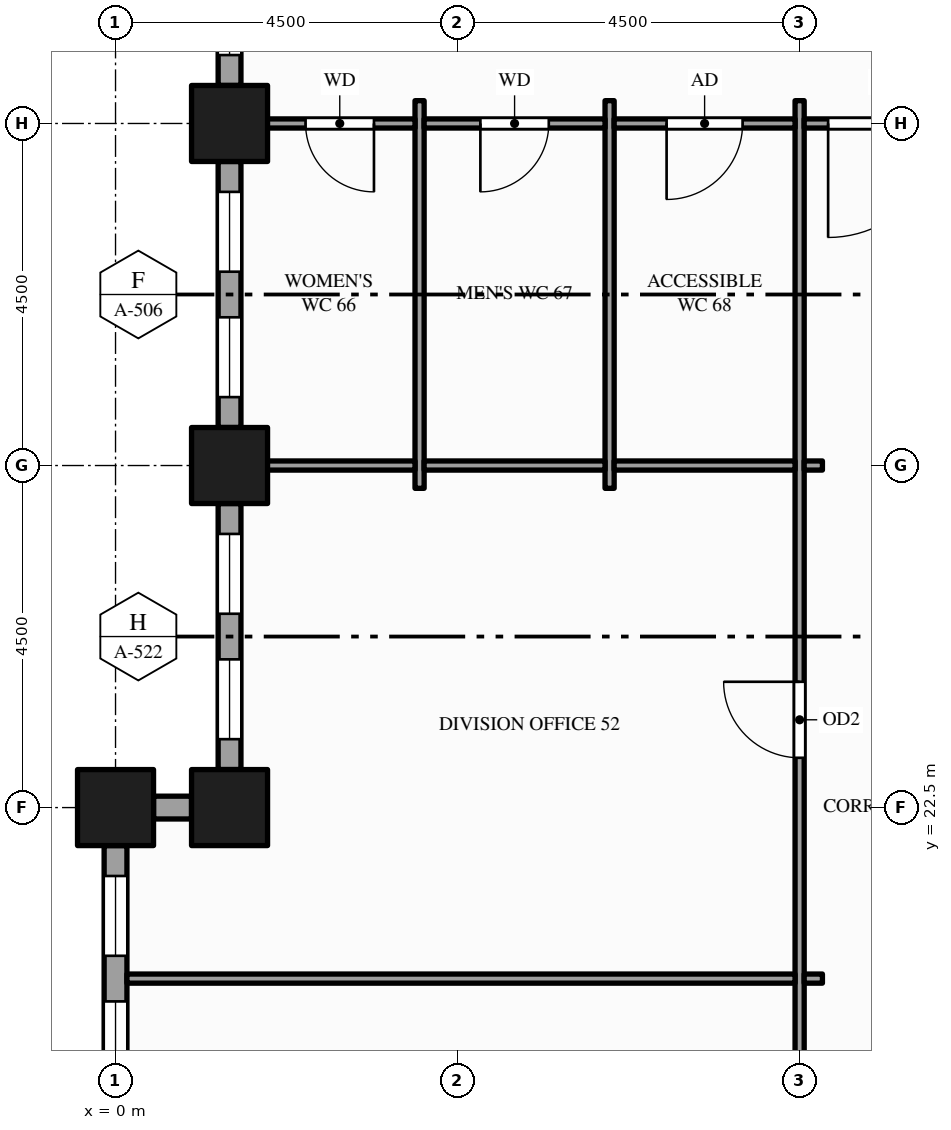
"""IFC4 building model, lengths in metres.
Left out: names, types, materials, properties, quantities, classifications, styles, units other than length and angle.
Written with IfcOpenShell. Run it as: python <this file> out.ifc"""

import sys

from ifc_helpers import new_model, si_unit, direction, frame, frame_2d, origin, origin_2d, place, context, subcontext, project, spatial, rectangle, hollow_rectangle, extrude, element, fill, save


model = new_model("IFC4")
c1 = context("Model", 3, precision=1e-05, world=origin(), true_north=direction((0.0, 1.0)))
c2 = subcontext(c1, "Body", "Model", "MODEL_VIEW")
j1 = project(units=[si_unit("LENGTHUNIT", "METRE"), si_unit("PLANEANGLEUNIT", "RADIAN")], contexts=[c1])
p1 = place(None, origin())
s1 = spatial("IfcSite", under=j1, at=p1, CompositionType="ELEMENT")
p2 = place(p1, origin())
s2 = spatial("IfcBuilding", under=s1, at=p2, CompositionType="ELEMENT")
p3 = place(p2, frame((0.0, 0.0, 127.0)))
s3 = spatial("IfcBuildingStorey", under=s2, at=p3, CompositionType="ELEMENT", Elevation=127.0)
for number, where, z_axis, x_axis in (
    (1, (0.0, 22.5, -0.15), (0.0, 0.0, 1.0), (1.0, 0.0, 0.0)),
    (2, (1.5, 22.5, -0.15), (0.0, 0.0, 1.0), (1.0, 0.0, 0.0)),
    (3, (1.5, 27.0, -0.15), (0.0, 0.0, 1.0), (1.0, 0.0, 0.0)),
    (4, (1.5, 31.5, -0.15), (0.0, 0.0, 1.0), (1.0, 0.0, 0.0)),
):
    element("IfcColumn", number, at=place(p3, frame(where, z_axis=z_axis, x_axis=x_axis)), inside=s3, PredefinedType="COLUMN", context=c2, shape_type="SweptSolid", body=[
        extrude(hollow_rectangle(XDim=1.0, YDim=1.0, WallThickness=0.05, at=origin_2d()), origin(), (0.0, 0.0, 1.0), 3.9),
    ])
p4 = place(p3, frame((1.5, 36.0, 0.0), z_axis=(0.0, 0.0, 1.0), x_axis=(0.0, -1.0, 0.0)))
e5 = element("IfcWall", 5, at=p4, inside=s3, PredefinedType="STANDARD", context=c2, shape_type="SweptSolid", body=[
    extrude(rectangle(XDim=4.0, YDim=0.3, at=frame_2d((2.0, 0.0))), origin(), (0.0, 0.0, 1.0), 3.054),
])
p5 = place(p4, frame((0.4, 0.0, 0.9)))
e6 = element("IfcOpeningElement", 6, at=p5, cuts=e5, PredefinedType="OPENING", context=c2, shape_type="SweptSolid", body=[
    extrude(rectangle(XDim=1.55, YDim=2.0, at=frame_2d((0.775, 1.0))), frame((0.0, 0.16, 0.0), z_axis=(0.0, -1.0, 0.0), x_axis=(1.0, 0.0, 0.0)), (0.0, 0.0, 1.0), 0.32),
])
p6 = place(p4, frame((2.55, 0.0, 0.9)))
e7 = element("IfcOpeningElement", 7, at=p6, cuts=e5, PredefinedType="OPENING", context=c2, shape_type="SweptSolid", body=[
    extrude(rectangle(XDim=1.05, YDim=2.0, at=frame_2d((0.525, 1.0))), frame((0.0, 0.16, 0.0), z_axis=(0.0, -1.0, 0.0), x_axis=(1.0, 0.0, 0.0)), (0.0, 0.0, 1.0), 0.32),
])
p7 = place(p3, frame((1.5, 31.0, 0.0), z_axis=(0.0, 0.0, 1.0), x_axis=(0.0, -1.0, 0.0)))
e8 = element("IfcWall", 8, at=p7, inside=s3, PredefinedType="STANDARD", context=c2, shape_type="SweptSolid", body=[
    extrude(rectangle(XDim=3.5, YDim=0.3, at=frame_2d((1.75, 0.0))), origin(), (0.0, 0.0, 1.0), 3.054),
])
p8 = place(p7, frame((0.4, 0.0, 0.9)))
e9 = element("IfcOpeningElement", 9, at=p8, cuts=e8, PredefinedType="OPENING", context=c2, shape_type="SweptSolid", body=[
    extrude(rectangle(XDim=1.05, YDim=2.0, at=frame_2d((0.525, 1.0))), frame((0.0, 0.16, 0.0), z_axis=(0.0, -1.0, 0.0), x_axis=(1.0, 0.0, 0.0)), (0.0, 0.0, 1.0), 0.32),
])
p9 = place(p7, frame((2.05, 0.0, 0.9)))
e10 = element("IfcOpeningElement", 10, at=p9, cuts=e8, PredefinedType="OPENING", context=c2, shape_type="SweptSolid", body=[
    extrude(rectangle(XDim=1.05, YDim=2.0, at=frame_2d((0.525, 1.0))), frame((0.0, 0.16, 0.0), z_axis=(0.0, -1.0, 0.0), x_axis=(1.0, 0.0, 0.0)), (0.0, 0.0, 1.0), 0.32),
])
p10 = place(p3, frame((1.5, 26.5, 0.0), z_axis=(0.0, 0.0, 1.0), x_axis=(0.0, -1.0, 0.0)))
e11 = element("IfcWall", 11, at=p10, inside=s3, PredefinedType="STANDARD", context=c2, shape_type="SweptSolid", body=[
    extrude(rectangle(XDim=3.5, YDim=0.3, at=frame_2d((1.75, 0.0))), origin(), (0.0, 0.0, 1.0), 3.054),
])
p11 = place(p10, frame((0.4, 0.0, 0.9)))
e12 = element("IfcOpeningElement", 12, at=p11, cuts=e11, PredefinedType="OPENING", context=c2, shape_type="SweptSolid", body=[
    extrude(rectangle(XDim=1.05, YDim=2.0, at=frame_2d((0.525, 1.0))), frame((0.0, 0.16, 0.0), z_axis=(0.0, -1.0, 0.0), x_axis=(1.0, 0.0, 0.0)), (0.0, 0.0, 1.0), 0.32),
])
p12 = place(p10, frame((2.05, 0.0, 0.9)))
e13 = element("IfcOpeningElement", 13, at=p12, cuts=e11, PredefinedType="OPENING", context=c2, shape_type="SweptSolid", body=[
    extrude(rectangle(XDim=1.05, YDim=2.0, at=frame_2d((0.525, 1.0))), frame((0.0, 0.16, 0.0), z_axis=(0.0, -1.0, 0.0), x_axis=(1.0, 0.0, 0.0)), (0.0, 0.0, 1.0), 0.32),
])
p13 = place(p3, frame((1.0, 22.5, 0.0), z_axis=(0.0, 0.0, 1.0), x_axis=(-1.0, 0.0, 0.0)))
e14 = element("IfcWall", 14, at=p13, inside=s3, PredefinedType="STANDARD", context=c2, shape_type="SweptSolid", body=[
    extrude(rectangle(XDim=0.5, YDim=0.3, at=frame_2d((0.25, 0.0))), origin(), (0.0, 0.0, 1.0), 3.054),
])
p14 = place(p3, frame((0.0, 22.0, 0.0), z_axis=(0.0, 0.0, 1.0), x_axis=(0.0, -1.0, 0.0)))
e15 = element("IfcWall", 15, at=p14, inside=s3, PredefinedType="STANDARD", context=c2, shape_type="SweptSolid", body=[
    extrude(rectangle(XDim=3.5, YDim=0.3, at=frame_2d((1.75, 0.0))), origin(), (0.0, 0.0, 1.0), 3.054),
])
p15 = place(p14, frame((0.4, 0.0, 0.9)))
e16 = element("IfcOpeningElement", 16, at=p15, cuts=e15, PredefinedType="OPENING", context=c2, shape_type="SweptSolid", body=[
    extrude(rectangle(XDim=1.05, YDim=2.0, at=frame_2d((0.525, 1.0))), frame((0.0, 0.16, 0.0), z_axis=(0.0, -1.0, 0.0), x_axis=(1.0, 0.0, 0.0)), (0.0, 0.0, 1.0), 0.32),
])
p16 = place(p14, frame((2.05, 0.0, 0.9)))
e17 = element("IfcOpeningElement", 17, at=p16, cuts=e15, PredefinedType="OPENING", context=c2, shape_type="SweptSolid", body=[
    extrude(rectangle(XDim=1.05, YDim=2.0, at=frame_2d((0.525, 1.0))), frame((0.0, 0.16, 0.0), z_axis=(0.0, -1.0, 0.0), x_axis=(1.0, 0.0, 0.0)), (0.0, 0.0, 1.0), 0.32),
])
for number, where, z_axis, x_axis in (
    (18, (4.0, 26.7, 0.0), (0.0, 0.0, 1.0), (0.0, 1.0, 0.0)),
    (19, (6.5, 26.7, 0.0), (0.0, 0.0, 1.0), (0.0, 1.0, 0.0)),
):
    element("IfcWall", number, at=place(p3, frame(where, z_axis=z_axis, x_axis=x_axis)), inside=s3, PredefinedType="PARTITIONING", context=c2, shape_type="SweptSolid", body=[
        extrude(rectangle(XDim=5.1, YDim=0.12, at=frame_2d((2.55, 0.0))), origin(), (0.0, 0.0, 1.0), 3.75),
    ])
p17 = place(p3, frame((9.0, 13.2, 0.0), z_axis=(0.0, 0.0, 1.0), x_axis=(0.0, 1.0, 0.0)))
e20 = element("IfcWall", 20, at=p17, inside=s3, PredefinedType="PARTITIONING", context=c2, shape_type="SweptSolid", body=[
    extrude(rectangle(XDim=18.6, YDim=0.12, at=frame_2d((9.3, 0.0))), origin(), (0.0, 0.0, 1.0), 2.5),
])
p18 = place(p17, frame((3.175, 0.0, 0.0)))
e21 = element("IfcOpeningElement", 21, at=p18, cuts=e20, PredefinedType="OPENING", context=c2, shape_type="SweptSolid", body=[
    extrude(rectangle(XDim=1.0, YDim=2.1, at=frame_2d((0.5, 1.05))), frame((0.0, 0.07, 0.0), z_axis=(0.0, -1.0, 0.0), x_axis=(1.0, 0.0, 0.0)), (0.0, 0.0, 1.0), 0.14),
])
p19 = place(p17, frame((9.955, 0.0, 0.0)))
e22 = element("IfcOpeningElement", 22, at=p19, cuts=e20, PredefinedType="OPENING", context=c2, shape_type="SweptSolid", body=[
    extrude(rectangle(XDim=1.0, YDim=2.1, at=frame_2d((0.5, 1.05))), frame((0.0, 0.07, 0.0), z_axis=(0.0, -1.0, 0.0), x_axis=(1.0, 0.0, 0.0)), (0.0, 0.0, 1.0), 0.14),
])
p20 = place(p3, frame((0.15, 20.25, 0.0), z_axis=(0.0, 0.0, 1.0), x_axis=(1.0, 0.0, 0.0)))
e23 = element("IfcWall", 23, at=p20, inside=s3, PredefinedType="PARTITIONING", context=c2, shape_type="SweptSolid", body=[
    extrude(rectangle(XDim=8.79, YDim=0.12, at=frame_2d((4.395, 0.0))), origin(), (0.0, 0.0, 1.0), 2.838),
])
p21 = place(p3, frame((9.06, 20.25, 0.0), z_axis=(0.0, 0.0, 1.0), x_axis=(1.0, 0.0, 0.0)))
e24 = element("IfcWall", 24, at=p21, inside=s3, PredefinedType="PARTITIONING", context=c2, shape_type="SweptSolid", body=[
    extrude(rectangle(XDim=0.24, YDim=0.12, at=frame_2d((0.12, 0.0))), origin(), (0.0, 0.0, 1.0), 2.838),
])
p22 = place(p3, frame((1.65, 27.0, 0.0), z_axis=(0.0, 0.0, 1.0), x_axis=(1.0, 0.0, 0.0)))
e25 = element("IfcWall", 25, at=p22, inside=s3, PredefinedType="PARTITIONING", context=c2, shape_type="SweptSolid", body=[
    extrude(rectangle(XDim=2.29, YDim=0.12, at=frame_2d((1.145, 0.0))), origin(), (0.0, 0.0, 1.0), 2.838),
])
for number, where, z_axis, x_axis in (
    (26, (4.06, 27.0, 0.0), (0.0, 0.0, 1.0), (1.0, 0.0, 0.0)),
    (27, (6.56, 27.0, 0.0), (0.0, 0.0, 1.0), (1.0, 0.0, 0.0)),
):
    element("IfcWall", number, at=place(p3, frame(where, z_axis=z_axis, x_axis=x_axis)), inside=s3, PredefinedType="PARTITIONING", context=c2, shape_type="SweptSolid", body=[
        extrude(rectangle(XDim=2.38, YDim=0.12, at=frame_2d((1.19, 0.0))), origin(), (0.0, 0.0, 1.0), 2.838),
    ])
p23 = place(p3, frame((9.06, 27.0, 0.0), z_axis=(0.0, 0.0, 1.0), x_axis=(1.0, 0.0, 0.0)))
e28 = element("IfcWall", 28, at=p23, inside=s3, PredefinedType="PARTITIONING", context=c2, shape_type="SweptSolid", body=[
    extrude(rectangle(XDim=0.24, YDim=0.12, at=frame_2d((0.12, 0.0))), origin(), (0.0, 0.0, 1.0), 2.838),
])
p24 = place(p3, frame((1.65, 31.5, 0.0), z_axis=(0.0, 0.0, 1.0), x_axis=(1.0, 0.0, 0.0)))
e29 = element("IfcWall", 29, at=p24, inside=s3, PredefinedType="PARTITIONING", context=c2, shape_type="SweptSolid", body=[
    extrude(rectangle(XDim=2.29, YDim=0.12, at=frame_2d((1.145, 0.0))), origin(), (0.0, 0.0, 1.0), 2.838),
])
p25 = place(p24, frame((0.85, 0.0, 0.0)))
e30 = element("IfcOpeningElement", 30, at=p25, cuts=e29, PredefinedType="OPENING", context=c2, shape_type="SweptSolid", body=[
    extrude(rectangle(XDim=0.9, YDim=2.1, at=frame_2d((0.45, 1.05))), frame((0.0, 0.07, 0.0), z_axis=(0.0, -1.0, 0.0), x_axis=(1.0, 0.0, 0.0)), (0.0, 0.0, 1.0), 0.14),
])
p26 = place(p3, frame((4.06, 31.5, 0.0), z_axis=(0.0, 0.0, 1.0), x_axis=(1.0, 0.0, 0.0)))
e31 = element("IfcWall", 31, at=p26, inside=s3, PredefinedType="PARTITIONING", context=c2, shape_type="SweptSolid", body=[
    extrude(rectangle(XDim=2.38, YDim=0.12, at=frame_2d((1.19, 0.0))), origin(), (0.0, 0.0, 1.0), 2.838),
])
p27 = place(p26, frame((0.74, 0.0, 0.0)))
e32 = element("IfcOpeningElement", 32, at=p27, cuts=e31, PredefinedType="OPENING", context=c2, shape_type="SweptSolid", body=[
    extrude(rectangle(XDim=0.9, YDim=2.1, at=frame_2d((0.45, 1.05))), frame((0.0, 0.07, 0.0), z_axis=(0.0, -1.0, 0.0), x_axis=(1.0, 0.0, 0.0)), (0.0, 0.0, 1.0), 0.14),
])
p28 = place(p3, frame((6.56, 31.5, 0.0), z_axis=(0.0, 0.0, 1.0), x_axis=(1.0, 0.0, 0.0)))
e33 = element("IfcWall", 33, at=p28, inside=s3, PredefinedType="PARTITIONING", context=c2, shape_type="SweptSolid", body=[
    extrude(rectangle(XDim=2.38, YDim=0.12, at=frame_2d((1.19, 0.0))), origin(), (0.0, 0.0, 1.0), 2.838),
])
p29 = place(p28, frame((0.69, 0.0, 0.0)))
e34 = element("IfcOpeningElement", 34, at=p29, cuts=e33, PredefinedType="OPENING", context=c2, shape_type="SweptSolid", body=[
    extrude(rectangle(XDim=1.0, YDim=2.1, at=frame_2d((0.5, 1.05))), frame((0.0, 0.07, 0.0), z_axis=(0.0, -1.0, 0.0), x_axis=(1.0, 0.0, 0.0)), (0.0, 0.0, 1.0), 0.14),
])
p30 = place(p3, frame((9.06, 31.5, 0.0), z_axis=(0.0, 0.0, 1.0), x_axis=(1.0, 0.0, 0.0)))
e35 = element("IfcWall", 35, at=p30, inside=s3, PredefinedType="PARTITIONING", context=c2, shape_type="SweptSolid", body=[
    extrude(rectangle(XDim=2.13, YDim=0.12, at=frame_2d((1.065, 0.0))), origin(), (0.0, 0.0, 1.0), 2.838),
])
p31 = place(p30, frame((0.315, 0.0, 0.0)))
e36 = element("IfcOpeningElement", 36, at=p31, cuts=e35, PredefinedType="OPENING", context=c2, shape_type="SweptSolid", body=[
    extrude(rectangle(XDim=1.5, YDim=2.1, at=frame_2d((0.75, 1.05))), frame((0.0, 0.07, 0.0), z_axis=(0.0, -1.0, 0.0), x_axis=(1.0, 0.0, 0.0)), (0.0, 0.0, 1.0), 0.14),
])
p32 = place(p6, origin())
e37 = element("IfcWindow", 37, at=p32, inside=s3, PartitioningType="SINGLE_PANEL", PredefinedType="WINDOW", context=c2, shape_type="SweptSolid", body=[
    extrude(rectangle(XDim=1.05, YDim=2.0, at=frame_2d((0.525, 1.0))), frame((0.0, 0.03, 0.0), z_axis=(0.0, -1.0, 0.0), x_axis=(1.0, 0.0, 0.0)), (0.0, 0.0, 1.0), 0.06),
])
fill(e7, e37)
p33 = place(p8, origin())
e38 = element("IfcWindow", 38, at=p33, inside=s3, PartitioningType="SINGLE_PANEL", PredefinedType="WINDOW", context=c2, shape_type="SweptSolid", body=[
    extrude(rectangle(XDim=1.05, YDim=2.0, at=frame_2d((0.525, 1.0))), frame((0.0, 0.03, 0.0), z_axis=(0.0, -1.0, 0.0), x_axis=(1.0, 0.0, 0.0)), (0.0, 0.0, 1.0), 0.06),
])
fill(e9, e38)
p34 = place(p9, origin())
e39 = element("IfcWindow", 39, at=p34, inside=s3, PartitioningType="SINGLE_PANEL", PredefinedType="WINDOW", context=c2, shape_type="SweptSolid", body=[
    extrude(rectangle(XDim=1.05, YDim=2.0, at=frame_2d((0.525, 1.0))), frame((0.0, 0.03, 0.0), z_axis=(0.0, -1.0, 0.0), x_axis=(1.0, 0.0, 0.0)), (0.0, 0.0, 1.0), 0.06),
])
fill(e10, e39)
p35 = place(p11, origin())
e40 = element("IfcWindow", 40, at=p35, inside=s3, PartitioningType="SINGLE_PANEL", PredefinedType="WINDOW", context=c2, shape_type="SweptSolid", body=[
    extrude(rectangle(XDim=1.05, YDim=2.0, at=frame_2d((0.525, 1.0))), frame((0.0, 0.03, 0.0), z_axis=(0.0, -1.0, 0.0), x_axis=(1.0, 0.0, 0.0)), (0.0, 0.0, 1.0), 0.06),
])
fill(e12, e40)
p36 = place(p12, origin())
e41 = element("IfcWindow", 41, at=p36, inside=s3, PartitioningType="SINGLE_PANEL", PredefinedType="WINDOW", context=c2, shape_type="SweptSolid", body=[
    extrude(rectangle(XDim=1.05, YDim=2.0, at=frame_2d((0.525, 1.0))), frame((0.0, 0.03, 0.0), z_axis=(0.0, -1.0, 0.0), x_axis=(1.0, 0.0, 0.0)), (0.0, 0.0, 1.0), 0.06),
])
fill(e13, e41)
p37 = place(p15, origin())
e42 = element("IfcWindow", 42, at=p37, inside=s3, PartitioningType="SINGLE_PANEL", PredefinedType="WINDOW", context=c2, shape_type="SweptSolid", body=[
    extrude(rectangle(XDim=1.05, YDim=2.0, at=frame_2d((0.525, 1.0))), frame((0.0, 0.03, 0.0), z_axis=(0.0, -1.0, 0.0), x_axis=(1.0, 0.0, 0.0)), (0.0, 0.0, 1.0), 0.06),
])
fill(e16, e42)
p38 = place(p16, origin())
e43 = element("IfcWindow", 43, at=p38, inside=s3, PartitioningType="SINGLE_PANEL", PredefinedType="WINDOW", context=c2, shape_type="SweptSolid", body=[
    extrude(rectangle(XDim=1.05, YDim=2.0, at=frame_2d((0.525, 1.0))), frame((0.0, 0.03, 0.0), z_axis=(0.0, -1.0, 0.0), x_axis=(1.0, 0.0, 0.0)), (0.0, 0.0, 1.0), 0.06),
])
fill(e17, e43)
p39 = place(p31, origin())
e44 = element("IfcDoor", 44, at=p39, inside=s3, OperationType="SINGLE_SWING_LEFT", PredefinedType="DOOR", context=c2, shape_type="SweptSolid", body=[
    extrude(rectangle(XDim=1.5, YDim=2.1, at=frame_2d((0.75, 1.05))), frame((0.0, 0.025, 0.0), z_axis=(0.0, -1.0, 0.0), x_axis=(1.0, 0.0, 0.0)), (0.0, 0.0, 1.0), 0.05),
])
fill(e36, e44)
p40 = place(p19, origin())
e45 = element("IfcDoor", 45, at=p40, inside=s3, OperationType="SINGLE_SWING_RIGHT", PredefinedType="DOOR", context=c2, shape_type="SweptSolid", body=[
    extrude(rectangle(XDim=1.0, YDim=2.1, at=frame_2d((0.5, 1.05))), frame((0.0, 0.025, 0.0), z_axis=(0.0, -1.0, 0.0), x_axis=(1.0, 0.0, 0.0)), (0.0, 0.0, 1.0), 0.05),
])
fill(e22, e45)
p41 = place(p25, origin())
e46 = element("IfcDoor", 46, at=p41, inside=s3, OperationType="SINGLE_SWING_RIGHT", PredefinedType="DOOR", context=c2, shape_type="SweptSolid", body=[
    extrude(rectangle(XDim=0.9, YDim=2.1, at=frame_2d((0.45, 1.05))), frame((0.0, 0.025, 0.0), z_axis=(0.0, -1.0, 0.0), x_axis=(1.0, 0.0, 0.0)), (0.0, 0.0, 1.0), 0.05),
])
fill(e30, e46)
p42 = place(p27, origin())
e47 = element("IfcDoor", 47, at=p42, inside=s3, OperationType="SINGLE_SWING_LEFT", PredefinedType="DOOR", context=c2, shape_type="SweptSolid", body=[
    extrude(rectangle(XDim=0.9, YDim=2.1, at=frame_2d((0.45, 1.05))), frame((0.0, 0.025, 0.0), z_axis=(0.0, -1.0, 0.0), x_axis=(1.0, 0.0, 0.0)), (0.0, 0.0, 1.0), 0.05),
])
fill(e32, e47)
p43 = place(p29, origin())
e48 = element("IfcDoor", 48, at=p43, inside=s3, OperationType="SINGLE_SWING_LEFT", PredefinedType="DOOR", context=c2, shape_type="SweptSolid", body=[
    extrude(rectangle(XDim=1.0, YDim=2.1, at=frame_2d((0.5, 1.05))), frame((0.0, 0.025, 0.0), z_axis=(0.0, -1.0, 0.0), x_axis=(1.0, 0.0, 0.0)), (0.0, 0.0, 1.0), 0.05),
])
fill(e34, e48)
save(model, sys.argv[1])
